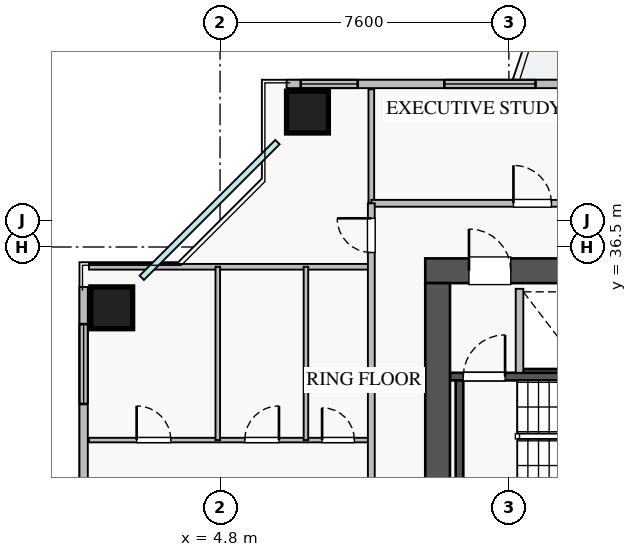
"""IFC4 building model, lengths in metres.
Left out: names, types, materials, properties, quantities, classifications, styles, units other than length and angle.
Written with IfcOpenShell. Run it as: python <this file> out.ifc"""

import sys

from ifc_helpers import new_model, si_unit, direction, frame, frame_2d, origin, origin_2d, place, context, subcontext, project, spatial, rectangle, extrude, source, transform, mapped, element, fill, save


model = new_model("IFC4")
c1 = context("Model", 3, precision=1e-05, world=origin(), true_north=direction((0.0, 1.0)))
c2 = subcontext(c1, "Body", "Model", "MODEL_VIEW")
j1 = project(units=[si_unit("LENGTHUNIT", "METRE"), si_unit("PLANEANGLEUNIT", "RADIAN")], contexts=[c1])
p1 = place(None, origin())
s1 = spatial("IfcSite", under=j1, at=p1, CompositionType="ELEMENT")
p2 = place(p1, origin())
s2 = spatial("IfcBuilding", under=s1, at=p2, CompositionType="ELEMENT")
p3 = place(p2, frame((0.0, 0.0, 110.0)))
s3 = spatial("IfcBuildingStorey", under=s2, at=p3, CompositionType="ELEMENT", Elevation=110.0)
p4 = place(p3, frame((12.68, 33.2, 0.0), z_axis=(0.0, 0.0, 1.0), x_axis=(1.0, 0.0, 0.0)))
e1 = element("IfcWall", 1, at=p4, inside=s3, PredefinedType="SHEAR", context=c2, shape_type="SweptSolid", body=[
    extrude(rectangle(XDim=1.94, YDim=0.18, at=frame_2d((0.97, 0.0))), origin(), (0.0, 0.0, 1.0), 3.07),
])
p5 = place(p3, frame((10.85, 33.09, 0.0), z_axis=(0.0, 0.0, 1.0), x_axis=(1.0, 0.0, 0.0)))
e2 = element("IfcWall", 2, at=p5, inside=s3, PredefinedType="SHEAR", context=c2, shape_type="SweptSolid", body=[
    extrude(rectangle(XDim=7.3, YDim=0.2, at=frame_2d((3.65, 0.0))), origin(), (0.0, 0.0, 1.0), 3.25),
])
p6 = place(p5, frame((0.35, 0.0, 0.0)))
e3 = element("IfcOpeningElement", 3, at=p6, cuts=e2, PredefinedType="OPENING", context=c2, shape_type="SweptSolid", body=[
    extrude(rectangle(XDim=1.1, YDim=2.05, at=frame_2d((0.55, 1.025))), frame((0.0, 0.11, 0.0), z_axis=(0.0, -1.0, 0.0), x_axis=(1.0, 0.0, 0.0)), (0.0, 0.0, 1.0), 0.22),
])
p7 = place(p3, frame((11.1, 30.05, 0.0), z_axis=(0.0, 0.0, 1.0), x_axis=(0.0, 1.0, 0.0)))
e4 = element("IfcWall", 4, at=p7, inside=s3, PredefinedType="SHEAR", context=c2, shape_type="SweptSolid", body=[
    extrude(rectangle(XDim=2.94, YDim=0.2, at=frame_2d((1.47, 0.0))), origin(), (0.0, 0.0, 1.0), 3.25),
])
p8 = place(p3, frame((10.2, 35.875, 0.0), z_axis=(0.0, 0.0, 1.0), x_axis=(1.0, 0.0, 0.0)))
e5 = element("IfcWall", 5, at=p8, inside=s3, PredefinedType="SHEAR", context=c2, shape_type="SweptSolid", body=[
    extrude(rectangle(XDim=17.6, YDim=0.65, at=frame_2d((8.8, 0.0))), origin(), (0.0, 0.0, 1.0), 3.25),
])
p9 = place(p8, frame((1.15, 0.0, 0.0)))
e6 = element("IfcOpeningElement", 6, at=p9, cuts=e5, PredefinedType="OPENING", context=c2, shape_type="SweptSolid", body=[
    extrude(rectangle(XDim=1.1, YDim=2.05, at=frame_2d((0.55, 1.025))), frame((0.0, 0.335, 0.0), z_axis=(0.0, -1.0, 0.0), x_axis=(1.0, 0.0, 0.0)), (0.0, 0.0, 1.0), 0.67),
])
p10 = place(p8, frame((8.3, 0.0, 0.0)))
e7 = element("IfcOpeningElement", 7, at=p10, cuts=e5, PredefinedType="OPENING", context=c2, shape_type="SweptSolid", body=[
    extrude(rectangle(XDim=1.1, YDim=2.05, at=frame_2d((0.55, 1.025))), frame((0.0, 0.335, 0.0), z_axis=(0.0, -1.0, 0.0), x_axis=(1.0, 0.0, 0.0)), (0.0, 0.0, 1.0), 0.67),
])
p11 = place(p8, frame((4.9, 0.0, 0.0)))
e8 = element("IfcOpeningElement", 8, at=p11, cuts=e5, PredefinedType="OPENING", context=c2, shape_type="SweptSolid", body=[
    extrude(rectangle(XDim=1.1, YDim=2.05, at=frame_2d((0.55, 1.025))), frame((0.0, 0.335, 0.0), z_axis=(0.0, -1.0, 0.0), x_axis=(1.0, 0.0, 0.0)), (0.0, 0.0, 1.0), 0.67),
])
p12 = place(p8, frame((14.74, 0.0, 0.0)))
e9 = element("IfcOpeningElement", 9, at=p12, cuts=e5, PredefinedType="OPENING", context=c2, shape_type="SweptSolid", body=[
    extrude(rectangle(XDim=1.0, YDim=2.05, at=frame_2d((0.5, 1.025))), frame((0.0, 0.335, 0.0), z_axis=(0.0, -1.0, 0.0), x_axis=(1.0, 0.0, 0.0)), (0.0, 0.0, 1.0), 0.67),
])
p13 = place(p8, frame((10.25, 0.0, 0.0)))
e10 = element("IfcOpeningElement", 10, at=p13, cuts=e5, PredefinedType="OPENING", context=c2, shape_type="SweptSolid", body=[
    extrude(rectangle(XDim=1.0, YDim=2.05, at=frame_2d((0.5, 1.025))), frame((0.0, 0.335, 0.0), z_axis=(0.0, -1.0, 0.0), x_axis=(1.0, 0.0, 0.0)), (0.0, 0.0, 1.0), 0.67),
])
p14 = place(p8, frame((12.7, 0.0, 0.0)))
e11 = element("IfcOpeningElement", 11, at=p14, cuts=e5, PredefinedType="OPENING", context=c2, shape_type="SweptSolid", body=[
    extrude(rectangle(XDim=1.0, YDim=2.05, at=frame_2d((0.5, 1.025))), frame((0.0, 0.335, 0.0), z_axis=(0.0, -1.0, 0.0), x_axis=(1.0, 0.0, 0.0)), (0.0, 0.0, 1.0), 0.67),
])
p15 = place(p3, frame((10.525, 29.65, 0.0), z_axis=(0.0, 0.0, 1.0), x_axis=(0.0, 1.0, 0.0)))
e12 = element("IfcWall", 12, at=p15, inside=s3, PredefinedType="SHEAR", context=c2, shape_type="SweptSolid", body=[
    extrude(rectangle(XDim=5.9, YDim=0.65, at=frame_2d((2.95, 0.0))), origin(), (0.0, 0.0, 1.0), 3.25),
])
m1 = source(origin(), c2, "Body", "SweptSolid", [
    extrude(rectangle(XDim=1.1, YDim=1.1, at=origin_2d()), origin(), (0.0, 0.0, 1.0), 3.25),
])
for number, where, z_axis, x_axis in (
    (13, (7.1, 40.05, 0.0), (0.0, 0.0, 1.0), (1.0, 0.0, 0.0)),
    (14, (1.95, 34.9, 0.0), (0.0, 0.0, 1.0), (1.0, 0.0, 0.0)),
):
    element("IfcColumn", number, at=place(p3, frame(where, z_axis=z_axis, x_axis=x_axis)), inside=s3, PredefinedType="COLUMN", context=c2, shape_type="MappedRepresentation", body=[
        mapped(m1, transform((0.0, 0.0, 0.0), x_axis=(1.0, 0.0, 0.0), y_axis=(0.0, 1.0, 0.0), z_axis=(0.0, 0.0, 1.0), scale=1.0)),
    ])
p16 = place(p3, frame((6.55, 40.79, 0.0), z_axis=(0.0, 0.0, 1.0), x_axis=(1.0, 0.0, 0.0)))
e15 = element("IfcWall", 15, at=p16, inside=s3, PredefinedType="STANDARD", context=c2, shape_type="SweptSolid", body=[
    extrude(rectangle(XDim=24.9, YDim=0.22, at=frame_2d((12.45, 0.0))), origin(), (0.0, 0.0, 1.0), 2.61),
])
p17 = place(p16, frame((13.3, 0.0, 0.0)))
e16 = element("IfcOpeningElement", 16, at=p17, cuts=e15, PredefinedType="OPENING", context=c2, shape_type="SweptSolid", body=[
    extrude(rectangle(XDim=1.2, YDim=2.1, at=frame_2d((0.6, 1.05))), frame((0.0, 0.12, 0.0), z_axis=(0.0, -1.0, 0.0), x_axis=(1.0, 0.0, 0.0)), (0.0, 0.0, 1.0), 0.24),
])
p18 = place(p16, frame((0.373, 0.0, 0.9)))
e17 = element("IfcOpeningElement", 17, at=p18, cuts=e15, PredefinedType="OPENING", context=c2, shape_type="SweptSolid", body=[
    extrude(rectangle(XDim=1.5, YDim=1.5, at=frame_2d((0.75, 0.75))), frame((0.0, 0.12, 0.0), z_axis=(0.0, -1.0, 0.0), x_axis=(1.0, 0.0, 0.0)), (0.0, 0.0, 1.0), 0.24),
])
p19 = place(p16, frame((8.438, 0.0, 0.9)))
e18 = element("IfcOpeningElement", 18, at=p19, cuts=e15, PredefinedType="OPENING", context=c2, shape_type="SweptSolid", body=[
    extrude(rectangle(XDim=1.8, YDim=1.45, at=frame_2d((0.9, 0.725))), frame((0.0, 0.12, 0.0), z_axis=(0.0, -1.0, 0.0), x_axis=(1.0, 0.0, 0.0)), (0.0, 0.0, 1.0), 0.24),
])
p20 = place(p16, frame((14.813, 0.0, 0.9)))
e19 = element("IfcOpeningElement", 19, at=p20, cuts=e15, PredefinedType="OPENING", context=c2, shape_type="SweptSolid", body=[
    extrude(rectangle(XDim=1.5, YDim=1.45, at=frame_2d((0.75, 0.725))), frame((0.0, 0.12, 0.0), z_axis=(0.0, -1.0, 0.0), x_axis=(1.0, 0.0, 0.0)), (0.0, 0.0, 1.0), 0.24),
])
p21 = place(p16, frame((20.738, 0.0, 0.9)))
e20 = element("IfcOpeningElement", 20, at=p21, cuts=e15, PredefinedType="OPENING", context=c2, shape_type="SweptSolid", body=[
    extrude(rectangle(XDim=2.1, YDim=1.48, at=frame_2d((1.05, 0.74))), frame((0.0, 0.12, 0.0), z_axis=(0.0, -1.0, 0.0), x_axis=(1.0, 0.0, 0.0)), (0.0, 0.0, 1.0), 0.24),
])
p22 = place(p16, frame((4.152, 0.0, 0.9)))
e21 = element("IfcOpeningElement", 21, at=p22, cuts=e15, PredefinedType="OPENING", context=c2, shape_type="SweptSolid", body=[
    extrude(rectangle(XDim=2.4, YDim=1.5, at=frame_2d((1.2, 0.75))), frame((0.0, 0.12, 0.0), z_axis=(0.0, -1.0, 0.0), x_axis=(1.0, 0.0, 0.0)), (0.0, 0.0, 1.0), 0.24),
])
p23 = place(p3, frame((1.21, 10.55, 0.0), z_axis=(0.0, 0.0, 1.0), x_axis=(0.0, 1.0, 0.0)))
e22 = element("IfcWall", 22, at=p23, inside=s3, PredefinedType="STANDARD", context=c2, shape_type="SweptSolid", body=[
    extrude(rectangle(XDim=24.9, YDim=0.22, at=frame_2d((12.45, 0.0))), origin(), (0.0, 0.0, 1.0), 2.61),
])
p24 = place(p23, frame((13.3, 0.0, 0.0)))
e23 = element("IfcOpeningElement", 23, at=p24, cuts=e22, PredefinedType="OPENING", context=c2, shape_type="SweptSolid", body=[
    extrude(rectangle(XDim=1.2, YDim=2.1, at=frame_2d((0.6, 1.05))), frame((0.0, 0.12, 0.0), z_axis=(0.0, -1.0, 0.0), x_axis=(1.0, 0.0, 0.0)), (0.0, 0.0, 1.0), 0.24),
])
p25 = place(p23, frame((1.912, 0.0, 0.9)))
e24 = element("IfcOpeningElement", 24, at=p25, cuts=e22, PredefinedType="OPENING", context=c2, shape_type="SweptSolid", body=[
    extrude(rectangle(XDim=2.4, YDim=1.48, at=frame_2d((1.2, 0.74))), frame((0.0, 0.12, 0.0), z_axis=(0.0, -1.0, 0.0), x_axis=(1.0, 0.0, 0.0)), (0.0, 0.0, 1.0), 0.24),
])
p26 = place(p23, frame((21.82, 0.0, 0.9)))
e25 = element("IfcOpeningElement", 25, at=p26, cuts=e22, PredefinedType="OPENING", context=c2, shape_type="SweptSolid", body=[
    extrude(rectangle(XDim=2.1, YDim=1.5, at=frame_2d((1.05, 0.75))), frame((0.0, 0.12, 0.0), z_axis=(0.0, -1.0, 0.0), x_axis=(1.0, 0.0, 0.0)), (0.0, 0.0, 1.0), 0.24),
])
p27 = place(p23, frame((14.72, 0.0, 0.9)))
e26 = element("IfcOpeningElement", 26, at=p27, cuts=e22, PredefinedType="OPENING", context=c2, shape_type="SweptSolid", body=[
    extrude(rectangle(XDim=0.9, YDim=1.2, at=frame_2d((0.45, 0.6))), frame((0.0, 0.12, 0.0), z_axis=(0.0, -1.0, 0.0), x_axis=(1.0, 0.0, 0.0)), (0.0, 0.0, 1.0), 0.24),
])
p28 = place(p23, frame((8.545, 0.0, 0.9)))
e27 = element("IfcOpeningElement", 27, at=p28, cuts=e22, PredefinedType="OPENING", context=c2, shape_type="SweptSolid", body=[
    extrude(rectangle(XDim=0.9, YDim=1.2, at=frame_2d((0.45, 0.6))), frame((0.0, 0.12, 0.0), z_axis=(0.0, -1.0, 0.0), x_axis=(1.0, 0.0, 0.0)), (0.0, 0.0, 1.0), 0.24),
])
p29 = place(p23, frame((16.895, 0.0, 0.9)))
e28 = element("IfcOpeningElement", 28, at=p29, cuts=e22, PredefinedType="OPENING", context=c2, shape_type="SweptSolid", body=[
    extrude(rectangle(XDim=0.9, YDim=1.2, at=frame_2d((0.45, 0.6))), frame((0.0, 0.12, 0.0), z_axis=(0.0, -1.0, 0.0), x_axis=(1.0, 0.0, 0.0)), (0.0, 0.0, 1.0), 0.24),
])
p30 = place(p3, frame((12.68, 33.19, 0.0), z_axis=(0.0, 0.0, 1.0), x_axis=(0.0, 1.0, 0.0)))
e29 = element("IfcWall", 29, at=p30, inside=s3, PredefinedType="PARTITIONING", context=c2, shape_type="SweptSolid", body=[
    extrude(rectangle(XDim=2.21, YDim=0.2, at=frame_2d((1.105, 0.0))), origin(), (0.0, 0.0, 1.0), 3.07),
])
p31 = place(p3, frame((8.78, 37.65, 0.0), z_axis=(0.0, 0.0, 1.0), x_axis=(0.0, 1.0, 0.0)))
e30 = element("IfcWall", 30, at=p31, inside=s3, PredefinedType="PARTITIONING", context=c2, shape_type="SweptSolid", body=[
    extrude(rectangle(XDim=3.0, YDim=0.15, at=frame_2d((1.5, 0.0))), origin(), (0.0, 0.0, 1.0), 3.07),
])
p32 = place(p3, frame((8.78, 37.65, 0.0), z_axis=(0.0, 0.0, 1.0), x_axis=(1.0, 0.0, 0.0)))
e31 = element("IfcWall", 31, at=p32, inside=s3, PredefinedType="PARTITIONING", context=c2, shape_type="SweptSolid", body=[
    extrude(rectangle(XDim=23.54, YDim=0.18, at=frame_2d((11.77, 0.0))), origin(), (0.0, 0.0, 1.0), 3.07),
])
p33 = place(p32, frame((3.74, 0.0, 0.0)))
e32 = element("IfcOpeningElement", 32, at=p33, cuts=e31, PredefinedType="OPENING", context=c2, shape_type="SweptSolid", body=[
    extrude(rectangle(XDim=1.0, YDim=2.05, at=frame_2d((0.5, 1.025))), frame((0.0, 0.1, 0.0), z_axis=(0.0, -1.0, 0.0), x_axis=(1.0, 0.0, 0.0)), (0.0, 0.0, 1.0), 0.2),
])
p34 = place(p32, frame((11.475, 0.0, 0.0)))
e33 = element("IfcOpeningElement", 33, at=p34, cuts=e31, PredefinedType="OPENING", context=c2, shape_type="SweptSolid", body=[
    extrude(rectangle(XDim=1.0, YDim=2.05, at=frame_2d((0.5, 1.025))), frame((0.0, 0.1, 0.0), z_axis=(0.0, -1.0, 0.0), x_axis=(1.0, 0.0, 0.0)), (0.0, 0.0, 1.0), 0.2),
])
p35 = place(p32, frame((18.835, 0.0, 0.0)))
e34 = element("IfcOpeningElement", 34, at=p35, cuts=e31, PredefinedType="OPENING", context=c2, shape_type="SweptSolid", body=[
    extrude(rectangle(XDim=1.0, YDim=2.05, at=frame_2d((0.5, 1.025))), frame((0.0, 0.1, 0.0), z_axis=(0.0, -1.0, 0.0), x_axis=(1.0, 0.0, 0.0)), (0.0, 0.0, 1.0), 0.2),
])
p36 = place(p3, frame((1.35, 35.98, 0.0), z_axis=(0.0, 0.0, 1.0), x_axis=(1.0, 0.0, 0.0)))
e35 = element("IfcWall", 35, at=p36, inside=s3, PredefinedType="PARTITIONING", context=c2, shape_type="SweptSolid", body=[
    extrude(rectangle(XDim=7.43, YDim=0.15, at=frame_2d((3.715, 0.0))), origin(), (0.0, 0.0, 1.0), 3.07),
])
p37 = place(p3, frame((1.35, 31.42, 0.0), z_axis=(0.0, 0.0, 1.0), x_axis=(1.0, 0.0, 0.0)))
e36 = element("IfcWall", 36, at=p37, inside=s3, PredefinedType="PLUMBINGWALL", context=c2, shape_type="SweptSolid", body=[
    extrude(rectangle(XDim=7.43, YDim=0.12, at=frame_2d((3.715, 0.0))), origin(), (0.0, 0.0, 1.0), 3.07),
])
p38 = place(p37, frame((1.255, 0.0, 0.0)))
e37 = element("IfcOpeningElement", 37, at=p38, cuts=e36, PredefinedType="OPENING", context=c2, shape_type="SweptSolid", body=[
    extrude(rectangle(XDim=0.9, YDim=2.05, at=frame_2d((0.45, 1.025))), frame((0.0, 0.07, 0.0), z_axis=(0.0, -1.0, 0.0), x_axis=(1.0, 0.0, 0.0)), (0.0, 0.0, 1.0), 0.14),
])
p39 = place(p37, frame((4.1, 0.0, 0.0)))
e38 = element("IfcOpeningElement", 38, at=p39, cuts=e36, PredefinedType="OPENING", context=c2, shape_type="SweptSolid", body=[
    extrude(rectangle(XDim=0.9, YDim=2.05, at=frame_2d((0.45, 1.025))), frame((0.0, 0.07, 0.0), z_axis=(0.0, -1.0, 0.0), x_axis=(1.0, 0.0, 0.0)), (0.0, 0.0, 1.0), 0.14),
])
p40 = place(p37, frame((6.135, 0.0, 0.0)))
e39 = element("IfcOpeningElement", 39, at=p40, cuts=e36, PredefinedType="OPENING", context=c2, shape_type="SweptSolid", body=[
    extrude(rectangle(XDim=0.85, YDim=2.05, at=frame_2d((0.425, 1.025))), frame((0.0, 0.07, 0.0), z_axis=(0.0, -1.0, 0.0), x_axis=(1.0, 0.0, 0.0)), (0.0, 0.0, 1.0), 0.14),
])
p41 = place(p3, frame((4.74, 31.42, 0.0), z_axis=(0.0, 0.0, 1.0), x_axis=(0.0, 1.0, 0.0)))
e40 = element("IfcWall", 40, at=p41, inside=s3, PredefinedType="PLUMBINGWALL", context=c2, shape_type="SweptSolid", body=[
    extrude(rectangle(XDim=4.56, YDim=0.12, at=frame_2d((2.28, 0.0))), origin(), (0.0, 0.0, 1.0), 3.07),
])
p42 = place(p3, frame((7.06, 31.42, 0.0), z_axis=(0.0, 0.0, 1.0), x_axis=(0.0, 1.0, 0.0)))
e41 = element("IfcWall", 41, at=p42, inside=s3, PredefinedType="PLUMBINGWALL", context=c2, shape_type="SweptSolid", body=[
    extrude(rectangle(XDim=4.56, YDim=0.12, at=frame_2d((2.28, 0.0))), origin(), (0.0, 0.0, 1.0), 2.577),
])
p43 = place(p3, frame((8.78, 8.31, 0.0), z_axis=(0.0, 0.0, 1.0), x_axis=(0.0, 1.0, 0.0)))
e42 = element("IfcWall", 42, at=p43, inside=s3, PredefinedType="PARTITIONING", context=c2, shape_type="SweptSolid", body=[
    extrude(rectangle(XDim=29.34, YDim=0.18, at=frame_2d((14.67, 0.0))), origin(), (0.0, 0.0, 1.0), 3.07),
])
p44 = place(p43, frame((28.045, 0.0, 0.0)))
e43 = element("IfcOpeningElement", 43, at=p44, cuts=e42, PredefinedType="OPENING", context=c2, shape_type="SweptSolid", body=[
    extrude(rectangle(XDim=0.9, YDim=2.05, at=frame_2d((0.45, 1.025))), frame((0.0, 0.1, 0.0), z_axis=(0.0, -1.0, 0.0), x_axis=(1.0, 0.0, 0.0)), (0.0, 0.0, 1.0), 0.2),
])
p45 = place(p43, frame((0.24, 0.0, 0.0)))
e44 = element("IfcOpeningElement", 44, at=p45, cuts=e42, PredefinedType="OPENING", context=c2, shape_type="SweptSolid", body=[
    extrude(rectangle(XDim=0.9, YDim=2.05, at=frame_2d((0.45, 1.025))), frame((0.0, 0.1, 0.0), z_axis=(0.0, -1.0, 0.0), x_axis=(1.0, 0.0, 0.0)), (0.0, 0.0, 1.0), 0.2),
])
p46 = place(p43, frame((5.455, 0.0, 0.0)))
e45 = element("IfcOpeningElement", 45, at=p46, cuts=e42, PredefinedType="OPENING", context=c2, shape_type="SweptSolid", body=[
    extrude(rectangle(XDim=1.0, YDim=2.05, at=frame_2d((0.5, 1.025))), frame((0.0, 0.1, 0.0), z_axis=(0.0, -1.0, 0.0), x_axis=(1.0, 0.0, 0.0)), (0.0, 0.0, 1.0), 0.2),
])
p47 = place(p43, frame((11.865, 0.0, 0.0)))
e46 = element("IfcOpeningElement", 46, at=p47, cuts=e42, PredefinedType="OPENING", context=c2, shape_type="SweptSolid", body=[
    extrude(rectangle(XDim=1.0, YDim=2.05, at=frame_2d((0.5, 1.025))), frame((0.0, 0.1, 0.0), z_axis=(0.0, -1.0, 0.0), x_axis=(1.0, 0.0, 0.0)), (0.0, 0.0, 1.0), 0.2),
])
p48 = place(p43, frame((20.315, 0.0, 0.0)))
e47 = element("IfcOpeningElement", 47, at=p48, cuts=e42, PredefinedType="OPENING", context=c2, shape_type="SweptSolid", body=[
    extrude(rectangle(XDim=1.0, YDim=2.05, at=frame_2d((0.5, 1.025))), frame((0.0, 0.1, 0.0), z_axis=(0.0, -1.0, 0.0), x_axis=(1.0, 0.0, 0.0)), (0.0, 0.0, 1.0), 0.2),
])
m2 = source(origin(), c2, "Body", "SweptSolid", [
    extrude(rectangle(XDim=1.5, YDim=1.5, at=frame_2d((0.75, 0.75))), frame((0.0, 0.03, 0.0), z_axis=(0.0, -1.0, 0.0), x_axis=(1.0, 0.0, 0.0)), (0.0, 0.0, 1.0), 0.06),
])
p49 = place(p18, origin())
e48 = element("IfcWindow", 48, at=p49, inside=s3, PartitioningType="TRIPLE_PANEL_VERTICAL", PredefinedType="WINDOW", context=c2, shape_type="MappedRepresentation", body=[
    mapped(m2, transform((0.0, 0.0, 0.0), x_axis=(1.0, 0.0, 0.0), y_axis=(0.0, 1.0, 0.0), z_axis=(0.0, 0.0, 1.0), scale=1.0)),
])
fill(e17, e48)
m3 = source(origin(), c2, "Body", "SweptSolid", [
    extrude(rectangle(XDim=2.1, YDim=1.5, at=frame_2d((1.05, 0.75))), frame((0.0, 0.03, 0.0), z_axis=(0.0, -1.0, 0.0), x_axis=(1.0, 0.0, 0.0)), (0.0, 0.0, 1.0), 0.06),
])
p50 = place(p26, origin())
e49 = element("IfcWindow", 49, at=p50, inside=s3, PartitioningType="TRIPLE_PANEL_VERTICAL", PredefinedType="WINDOW", context=c2, shape_type="MappedRepresentation", body=[
    mapped(m3, transform((0.0, 0.0, 0.0), x_axis=(1.0, 0.0, 0.0), y_axis=(0.0, 1.0, 0.0), z_axis=(0.0, 0.0, 1.0), scale=1.0)),
])
fill(e25, e49)
m4 = source(origin(), c2, "Body", "SweptSolid", [
    extrude(rectangle(XDim=1.1, YDim=2.05, at=frame_2d((0.55, 1.025))), frame((0.0, 0.025, 0.0), z_axis=(0.0, -1.0, 0.0), x_axis=(1.0, 0.0, 0.0)), (0.0, 0.0, 1.0), 0.05),
])
p51 = place(p9, origin())
e50 = element("IfcDoor", 50, at=p51, inside=s3, OperationType="SINGLE_SWING_LEFT", PredefinedType="DOOR", context=c2, shape_type="MappedRepresentation", body=[
    mapped(m4, transform((0.0, 0.0, 0.0), x_axis=(1.0, 0.0, 0.0), y_axis=(0.0, 1.0, 0.0), z_axis=(0.0, 0.0, 1.0), scale=1.0)),
])
fill(e6, e50)
p52 = place(p6, origin())
e51 = element("IfcDoor", 51, at=p52, inside=s3, OperationType="SINGLE_SWING_RIGHT", PredefinedType="DOOR", context=c2, shape_type="MappedRepresentation", body=[
    mapped(m4, transform((0.0, 0.0, 0.0), x_axis=(1.0, 0.0, 0.0), y_axis=(0.0, 1.0, 0.0), z_axis=(0.0, 0.0, 1.0), scale=1.0)),
])
fill(e3, e51)
m5 = source(origin(), c2, "Body", "SweptSolid", [
    extrude(rectangle(XDim=1.0, YDim=2.05, at=frame_2d((0.5, 1.025))), frame((0.0, 0.025, 0.0), z_axis=(0.0, -1.0, 0.0), x_axis=(1.0, 0.0, 0.0)), (0.0, 0.0, 1.0), 0.05),
])
p53 = place(p33, origin())
e52 = element("IfcDoor", 52, at=p53, inside=s3, OperationType="SINGLE_SWING_LEFT", PredefinedType="DOOR", context=c2, shape_type="MappedRepresentation", body=[
    mapped(m5, transform((0.0, 0.0, 0.0), x_axis=(1.0, 0.0, 0.0), y_axis=(0.0, 1.0, 0.0), z_axis=(0.0, 0.0, 1.0), scale=1.0)),
])
fill(e32, e52)
m6 = source(origin(), c2, "Body", "SweptSolid", [
    extrude(rectangle(XDim=0.9, YDim=2.05, at=frame_2d((0.45, 1.025))), frame((0.0, 0.025, 0.0), z_axis=(0.0, -1.0, 0.0), x_axis=(1.0, 0.0, 0.0)), (0.0, 0.0, 1.0), 0.05),
])
p54 = place(p38, origin())
e53 = element("IfcDoor", 53, at=p54, inside=s3, OperationType="SINGLE_SWING_LEFT", PredefinedType="DOOR", context=c2, shape_type="MappedRepresentation", body=[
    mapped(m6, transform((0.0, 0.0, 0.0), x_axis=(1.0, 0.0, 0.0), y_axis=(0.0, 1.0, 0.0), z_axis=(0.0, 0.0, 1.0), scale=1.0)),
])
fill(e37, e53)
p55 = place(p39, origin())
e54 = element("IfcDoor", 54, at=p55, inside=s3, OperationType="SINGLE_SWING_RIGHT", PredefinedType="DOOR", context=c2, shape_type="MappedRepresentation", body=[
    mapped(m6, transform((0.0, 0.0, 0.0), x_axis=(1.0, 0.0, 0.0), y_axis=(0.0, 1.0, 0.0), z_axis=(0.0, 0.0, 1.0), scale=1.0)),
])
fill(e38, e54)
m7 = source(origin(), c2, "Body", "SweptSolid", [
    extrude(rectangle(XDim=0.85, YDim=2.05, at=frame_2d((0.425, 1.025))), frame((0.0, 0.025, 0.0), z_axis=(0.0, -1.0, 0.0), x_axis=(1.0, 0.0, 0.0)), (0.0, 0.0, 1.0), 0.05),
])
p56 = place(p40, origin())
e55 = element("IfcDoor", 55, at=p56, inside=s3, OperationType="SINGLE_SWING_LEFT", PredefinedType="DOOR", context=c2, shape_type="MappedRepresentation", body=[
    mapped(m7, transform((0.0, 0.0, 0.0), x_axis=(1.0, 0.0, 0.0), y_axis=(0.0, 1.0, 0.0), z_axis=(0.0, 0.0, 1.0), scale=1.0)),
])
fill(e39, e55)
p57 = place(p44, origin())
e56 = element("IfcDoor", 56, at=p57, inside=s3, OperationType="SINGLE_SWING_RIGHT", PredefinedType="DOOR", context=c2, shape_type="MappedRepresentation", body=[
    mapped(m6, transform((0.0, 0.0, 0.0), x_axis=(1.0, 0.0, 0.0), y_axis=(0.0, 1.0, 0.0), z_axis=(0.0, 0.0, 1.0), scale=1.0)),
])
fill(e43, e56)
m8 = source(origin(), c2, "Body", "SweptSolid", [
    extrude(rectangle(XDim=2.4, YDim=1.5, at=frame_2d((1.2, 0.75))), frame((0.0, 0.03, 0.0), z_axis=(0.0, -1.0, 0.0), x_axis=(1.0, 0.0, 0.0)), (0.0, 0.0, 1.0), 0.06),
])
p58 = place(p22, origin())
e57 = element("IfcWindow", 57, at=p58, inside=s3, PartitioningType="TRIPLE_PANEL_VERTICAL", PredefinedType="WINDOW", context=c2, shape_type="MappedRepresentation", body=[
    mapped(m8, transform((0.0, 0.0, 0.0), x_axis=(1.0, 0.0, 0.0), y_axis=(0.0, 1.0, 0.0), z_axis=(0.0, 0.0, 1.0), scale=1.0)),
])
fill(e21, e57)
save(model, sys.argv[1])
